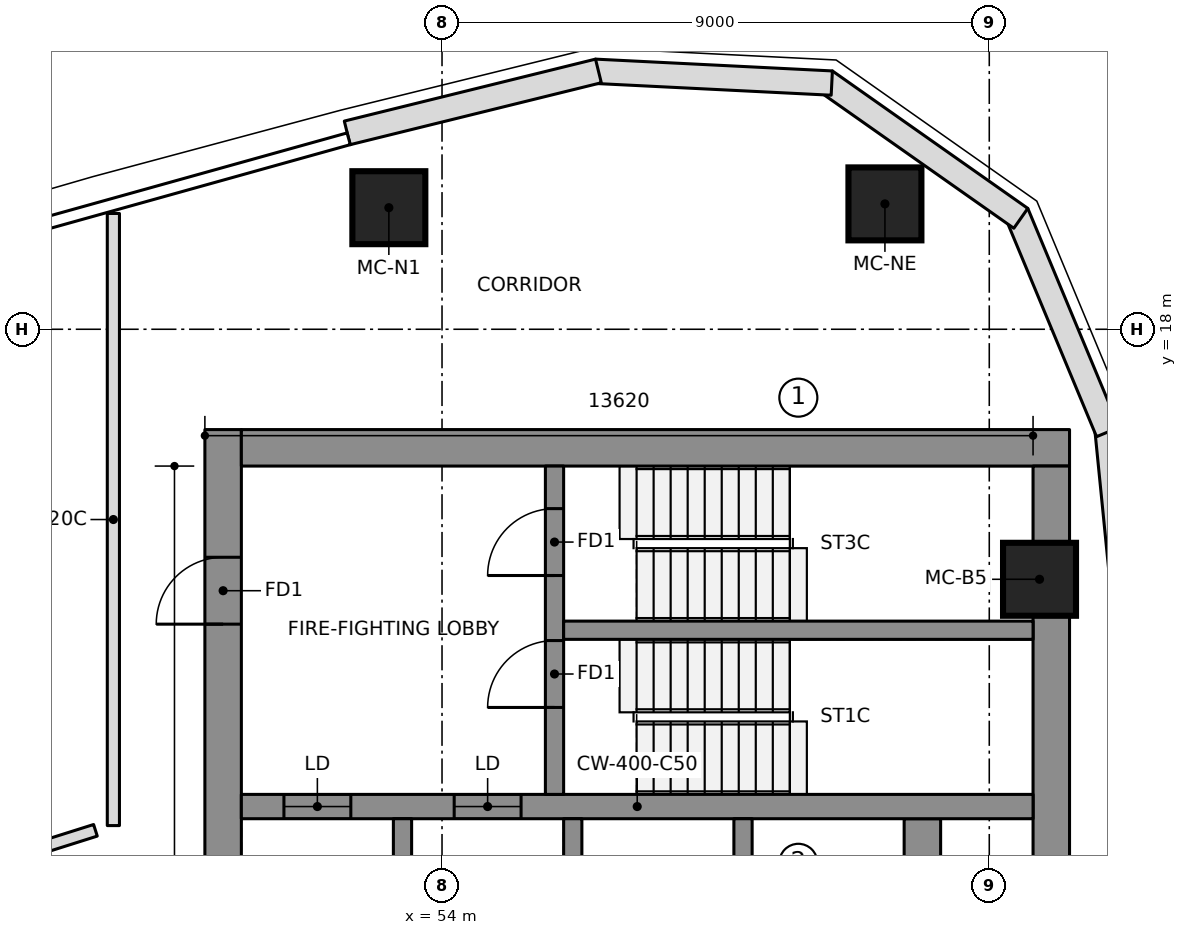
"""IFC4 building model, lengths in metres.
Left out: names, types, materials, properties, quantities, classifications, styles, units other than length and angle.
Written with IfcOpenShell. Run it as: python <this file> out.ifc"""

import sys

from ifc_helpers import new_model, si_unit, direction, frame, frame_2d, origin, origin_2d, place, context, subcontext, project, spatial, polyline, rectangle, outline, extrude, element, fill, save


model = new_model("IFC4")
c1 = context("Model", 3, precision=1e-05, world=origin(), true_north=direction((0.0, 1.0)))
c2 = subcontext(c1, "Body", "Model", "MODEL_VIEW")
j1 = project(units=[si_unit("LENGTHUNIT", "METRE"), si_unit("PLANEANGLEUNIT", "RADIAN")], contexts=[c1])
p1 = place(None, origin())
s1 = spatial("IfcSite", under=j1, at=p1, CompositionType="ELEMENT")
p2 = place(p1, origin())
s2 = spatial("IfcBuilding", under=s1, at=p2, CompositionType="ELEMENT")
p3 = place(p2, frame((0.0, 0.0, 242.1)))
s3 = spatial("IfcBuildingStorey", under=s2, at=p3, CompositionType="ELEMENT", Elevation=242.1)
p4 = place(p3, frame((50.4, 6.65, 0.0), z_axis=(0.0, 0.0, 1.0), x_axis=(0.0, 1.0, 0.0)))
e1 = element("IfcWall", 1, at=p4, inside=s3, PredefinedType="SHEAR", context=c2, shape_type="SweptSolid", body=[
    extrude(rectangle(XDim=9.7, YDim=0.6, at=frame_2d((4.85, 0.0))), origin(), (0.0, 0.0, 1.0), 3.55),
])
p5 = place(p4, frame((6.5, 0.0, 0.0)))
e2 = element("IfcOpeningElement", 2, at=p5, cuts=e1, PredefinedType="OPENING", context=c2, shape_type="SweptSolid", body=[
    extrude(rectangle(XDim=1.1, YDim=2.1, at=frame_2d((0.55, 1.05))), frame((0.0, 0.31, 0.0), z_axis=(0.0, -1.0, 0.0), x_axis=(1.0, 0.0, 0.0)), (0.0, 0.0, 1.0), 0.62),
])
p6 = place(p3, frame((50.7, 16.05, 0.0), z_axis=(0.0, 0.0, 1.0), x_axis=(1.0, 0.0, 0.0)))
e3 = element("IfcWall", 3, at=p6, inside=s3, PredefinedType="SHEAR", context=c2, shape_type="SweptSolid", body=[
    extrude(rectangle(XDim=13.62, YDim=0.6, at=frame_2d((6.81, 0.0))), origin(), (0.0, 0.0, 1.0), 3.55),
])
p7 = place(p3, frame((64.02, 7.502, 0.0), z_axis=(0.0, 0.0, 1.0), x_axis=(0.0, 1.0, 0.0)))
e4 = element("IfcWall", 4, at=p7, inside=s3, PredefinedType="SHEAR", context=c2, shape_type="SweptSolid", body=[
    extrude(rectangle(XDim=8.248, YDim=0.6, at=frame_2d((4.124, 0.0))), origin(), (0.0, 0.0, 1.0), 3.55),
])
p8 = place(p3, frame((61.9, -9.95, 0.0), z_axis=(0.0, 0.0, 1.0), x_axis=(0.0, 1.0, 0.0)))
e5 = element("IfcWall", 5, at=p8, inside=s3, PredefinedType="SHEAR", context=c2, shape_type="SweptSolid", body=[
    extrude(rectangle(XDim=19.9, YDim=0.6, at=frame_2d((9.95, 0.0))), origin(), (0.0, 0.0, 1.0), 3.55),
])
p9 = place(p3, frame((50.7, 10.15, 0.0), z_axis=(0.0, 0.0, 1.0), x_axis=(1.0, 0.0, 0.0)))
e6 = element("IfcWall", 6, at=p9, inside=s3, PredefinedType="SHEAR", context=c2, shape_type="SweptSolid", body=[
    extrude(rectangle(XDim=13.02, YDim=0.4, at=frame_2d((6.51, 0.0))), origin(), (0.0, 0.0, 1.0), 3.55),
])
p10 = place(p9, frame((0.7, 0.0, 0.0)))
e7 = element("IfcOpeningElement", 7, at=p10, cuts=e6, PredefinedType="OPENING", context=c2, shape_type="SweptSolid", body=[
    extrude(rectangle(XDim=1.1, YDim=2.1, at=frame_2d((0.55, 1.05))), frame((0.0, 0.21, 0.0), z_axis=(0.0, -1.0, 0.0), x_axis=(1.0, 0.0, 0.0)), (0.0, 0.0, 1.0), 0.42),
])
p11 = place(p9, frame((3.5, 0.0, 0.0)))
e8 = element("IfcOpeningElement", 8, at=p11, cuts=e6, PredefinedType="OPENING", context=c2, shape_type="SweptSolid", body=[
    extrude(rectangle(XDim=1.1, YDim=2.1, at=frame_2d((0.55, 1.05))), frame((0.0, 0.21, 0.0), z_axis=(0.0, -1.0, 0.0), x_axis=(1.0, 0.0, 0.0)), (0.0, 0.0, 1.0), 0.42),
])
for number, where, z_axis, x_axis in (
    (9, (53.35, 6.95, 0.0), (0.0, 0.0, 1.0), (0.0, 1.0, 0.0)),
    (10, (56.15, 6.95, 0.0), (0.0, 0.0, 1.0), (0.0, 1.0, 0.0)),
    (11, (58.95, 6.95, 0.0), (0.0, 0.0, 1.0), (0.0, 1.0, 0.0)),
):
    element("IfcWall", number, at=place(p3, frame(where, z_axis=z_axis, x_axis=x_axis)), inside=s3, PredefinedType="SHEAR", context=c2, shape_type="SweptSolid", body=[
        extrude(rectangle(XDim=3.0, YDim=0.3, at=frame_2d((1.5, 0.0))), origin(), (0.0, 0.0, 1.0), 3.55),
    ])
p12 = place(p3, frame((55.85, 10.35, 0.0), z_axis=(0.0, 0.0, 1.0), x_axis=(0.0, 1.0, 0.0)))
e12 = element("IfcWall", 12, at=p12, inside=s3, PredefinedType="SHEAR", context=c2, shape_type="SweptSolid", body=[
    extrude(rectangle(XDim=5.4, YDim=0.3, at=frame_2d((2.7, 0.0))), origin(), (0.0, 0.0, 1.0), 3.55),
])
p13 = place(p12, frame((1.43, 0.0, 0.0)))
e13 = element("IfcOpeningElement", 13, at=p13, cuts=e12, PredefinedType="OPENING", context=c2, shape_type="SweptSolid", body=[
    extrude(rectangle(XDim=1.1, YDim=2.1, at=frame_2d((0.55, 1.05))), frame((0.0, 0.16, 0.0), z_axis=(0.0, -1.0, 0.0), x_axis=(1.0, 0.0, 0.0)), (0.0, 0.0, 1.0), 0.32),
])
p14 = place(p12, frame((3.6, 0.0, 0.0)))
e14 = element("IfcOpeningElement", 14, at=p14, cuts=e12, PredefinedType="OPENING", context=c2, shape_type="SweptSolid", body=[
    extrude(rectangle(XDim=1.1, YDim=2.1, at=frame_2d((0.55, 1.05))), frame((0.0, 0.16, 0.0), z_axis=(0.0, -1.0, 0.0), x_axis=(1.0, 0.0, 0.0)), (0.0, 0.0, 1.0), 0.32),
])
p15 = place(p3, frame((56.0, 13.05, 0.0), z_axis=(0.0, 0.0, 1.0), x_axis=(1.0, 0.0, 0.0)))
e15 = element("IfcWall", 15, at=p15, inside=s3, PredefinedType="SHEAR", context=c2, shape_type="SweptSolid", body=[
    extrude(rectangle(XDim=7.72, YDim=0.3, at=frame_2d((3.86, 0.0))), origin(), (0.0, 0.0, 1.0), 3.55),
])
for number, where, z_axis, x_axis in (
    (16, (63.826, 13.888, 0.0), (0.0, 0.0, 1.0), (1.0, 0.0, 0.0)),
    (17, (61.284, 20.062, 0.0), (0.0, 0.0, 1.0), (1.0, 0.0, 0.0)),
    (18, (53.125, 20.0, 0.0), (0.0, 0.0, 1.0), (1.0, 0.0, 0.0)),
):
    element("IfcColumn", number, at=place(p3, frame(where, z_axis=z_axis, x_axis=x_axis)), inside=s3, PredefinedType="COLUMN", context=c2, shape_type="SweptSolid", body=[
        extrude(rectangle(XDim=1.2, YDim=1.2, at=origin_2d()), origin(), (0.0, 0.0, 1.0), 3.55),
    ])
p16 = place(p3, frame((65.342, 12.264, 0.0), z_axis=(0.0, 0.0, 1.0), x_axis=(-0.098718218066, 0.995115427185, 0.0)))
e19 = element("IfcWall", 19, at=p16, inside=s3, PredefinedType="NOTDEFINED", context=c2, shape_type="SweptSolid", body=[
    extrude(outline(polyline([(-0.003, -0.2), (4.123, -0.2), (4.063, 0.2), (0.003, 0.2), (-0.003, -0.2)])), origin(), (0.0, 0.0, 1.0), 3.25),
])
p17 = place(p3, frame((64.938, 16.337, 0.0), z_axis=(0.0, 0.0, 1.0), x_axis=(-0.3844335483, 0.923152667191, 0.0)))
e20 = element("IfcWall", 20, at=p17, inside=s3, PredefinedType="NOTDEFINED", context=c2, shape_type="SweptSolid", body=[
    extrude(outline(polyline([(-0.03, -0.2), (3.871, -0.2), (3.756, 0.2), (0.03, 0.2), (-0.03, -0.2)])), origin(), (0.0, 0.0, 1.0), 3.25),
])
p18 = place(p3, frame((63.471, 19.858, 0.0), z_axis=(0.0, 0.0, 1.0), x_axis=(-0.817942545532, 0.575299915009, 0.0)))
e21 = element("IfcWall", 21, at=p18, inside=s3, PredefinedType="NOTDEFINED", context=c2, shape_type="SweptSolid", body=[
    extrude(outline(polyline([(-0.058, -0.2), (3.871, -0.2), (3.756, 0.2), (0.058, 0.2), (-0.058, -0.2)])), origin(), (0.0, 0.0, 1.0), 3.25),
])
p19 = place(p3, frame((60.352, 22.052, 0.0), z_axis=(0.0, 0.0, 1.0), x_axis=(-0.998758875872, 0.049806705046, 0.0)))
e22 = element("IfcWall", 22, at=p19, inside=s3, PredefinedType="NOTDEFINED", context=c2, shape_type="SweptSolid", body=[
    extrude(outline(polyline([(-0.058, -0.2), (3.843, -0.2), (3.784, 0.2), (0.058, 0.2), (-0.058, -0.2)])), origin(), (0.0, 0.0, 1.0), 3.25),
])
p20 = place(p3, frame((56.543, 22.242, 0.0), z_axis=(0.0, 0.0, 1.0), x_axis=(-0.970902342456, -0.23947576373, 0.0)))
e23 = element("IfcWall", 23, at=p20, inside=s3, PredefinedType="NOTDEFINED", context=c2, shape_type="SweptSolid", body=[
    extrude(outline(polyline([(-0.029, -0.2), (4.226, -0.2), (4.226, 0.2), (0.029, 0.2), (-0.029, -0.2)])), origin(), (0.0, 0.0, 1.0), 3.25),
])
p21 = place(p3, frame((40.38, 7.257, 0.0), z_axis=(0.0, 0.0, 1.0), x_axis=(0.953536454425, 0.301277662768, 0.0)))
e24 = element("IfcWall", 24, at=p21, inside=s3, PredefinedType="PARTITIONING", context=c2, shape_type="SweptSolid", body=[
    extrude(rectangle(XDim=8.306, YDim=0.2, at=frame_2d((4.153, 0.0))), origin(), (0.0, 0.0, 1.0), 3.25),
])
p22 = place(p21, frame((2.8, 0.0, 0.0)))
e25 = element("IfcOpeningElement", 25, at=p22, cuts=e24, PredefinedType="OPENING", context=c2, shape_type="SweptSolid", body=[
    extrude(rectangle(XDim=1.5, YDim=2.1, at=frame_2d((0.75, 1.05))), frame((0.0, 0.11, 0.0), z_axis=(0.0, -1.0, 0.0), x_axis=(1.0, 0.0, 0.0)), (0.0, 0.0, 1.0), 0.22),
])
p23 = place(p3, frame((48.595, 19.904, 0.0), z_axis=(0.0, 0.0, 1.0), x_axis=(0.0, -1.0, 0.0)))
e26 = element("IfcWall", 26, at=p23, inside=s3, PredefinedType="PARTITIONING", context=c2, shape_type="SweptSolid", body=[
    extrude(rectangle(XDim=10.067, YDim=0.2, at=frame_2d((5.034, 0.0))), origin(), (0.0, 0.0, 1.0), 3.25),
])
p24 = place(p10, origin())
e27 = element("IfcDoor", 27, at=p24, inside=s3, OperationType="DOUBLE_DOOR_SLIDING", PredefinedType="DOOR", context=c2, shape_type="SweptSolid", body=[
    extrude(rectangle(XDim=1.1, YDim=2.1, at=frame_2d((0.55, 1.05))), frame((0.0, 0.025, 0.0), z_axis=(0.0, -1.0, 0.0), x_axis=(1.0, 0.0, 0.0)), (0.0, 0.0, 1.0), 0.05),
])
fill(e7, e27)
p25 = place(p11, origin())
e28 = element("IfcDoor", 28, at=p25, inside=s3, OperationType="DOUBLE_DOOR_SLIDING", PredefinedType="DOOR", context=c2, shape_type="SweptSolid", body=[
    extrude(rectangle(XDim=1.1, YDim=2.1, at=frame_2d((0.55, 1.05))), frame((0.0, 0.025, 0.0), z_axis=(0.0, -1.0, 0.0), x_axis=(1.0, 0.0, 0.0)), (0.0, 0.0, 1.0), 0.05),
])
fill(e8, e28)
p26 = place(p13, origin())
e29 = element("IfcDoor", 29, at=p26, inside=s3, OperationType="SINGLE_SWING_RIGHT", PredefinedType="DOOR", context=c2, shape_type="SweptSolid", body=[
    extrude(rectangle(XDim=1.1, YDim=2.1, at=frame_2d((0.55, 1.05))), frame((0.0, 0.025, 0.0), z_axis=(0.0, -1.0, 0.0), x_axis=(1.0, 0.0, 0.0)), (0.0, 0.0, 1.0), 0.05),
])
fill(e13, e29)
p27 = place(p14, origin())
e30 = element("IfcDoor", 30, at=p27, inside=s3, OperationType="SINGLE_SWING_RIGHT", PredefinedType="DOOR", context=c2, shape_type="SweptSolid", body=[
    extrude(rectangle(XDim=1.1, YDim=2.1, at=frame_2d((0.55, 1.05))), frame((0.0, 0.025, 0.0), z_axis=(0.0, -1.0, 0.0), x_axis=(1.0, 0.0, 0.0)), (0.0, 0.0, 1.0), 0.05),
])
fill(e14, e30)
p28 = place(p5, origin())
e31 = element("IfcDoor", 31, at=p28, inside=s3, OperationType="SINGLE_SWING_RIGHT", PredefinedType="DOOR", context=c2, shape_type="SweptSolid", body=[
    extrude(rectangle(XDim=1.1, YDim=2.1, at=frame_2d((0.55, 1.05))), frame((0.0, 0.025, 0.0), z_axis=(0.0, -1.0, 0.0), x_axis=(1.0, 0.0, 0.0)), (0.0, 0.0, 1.0), 0.05),
])
fill(e2, e31)
save(model, sys.argv[1])
